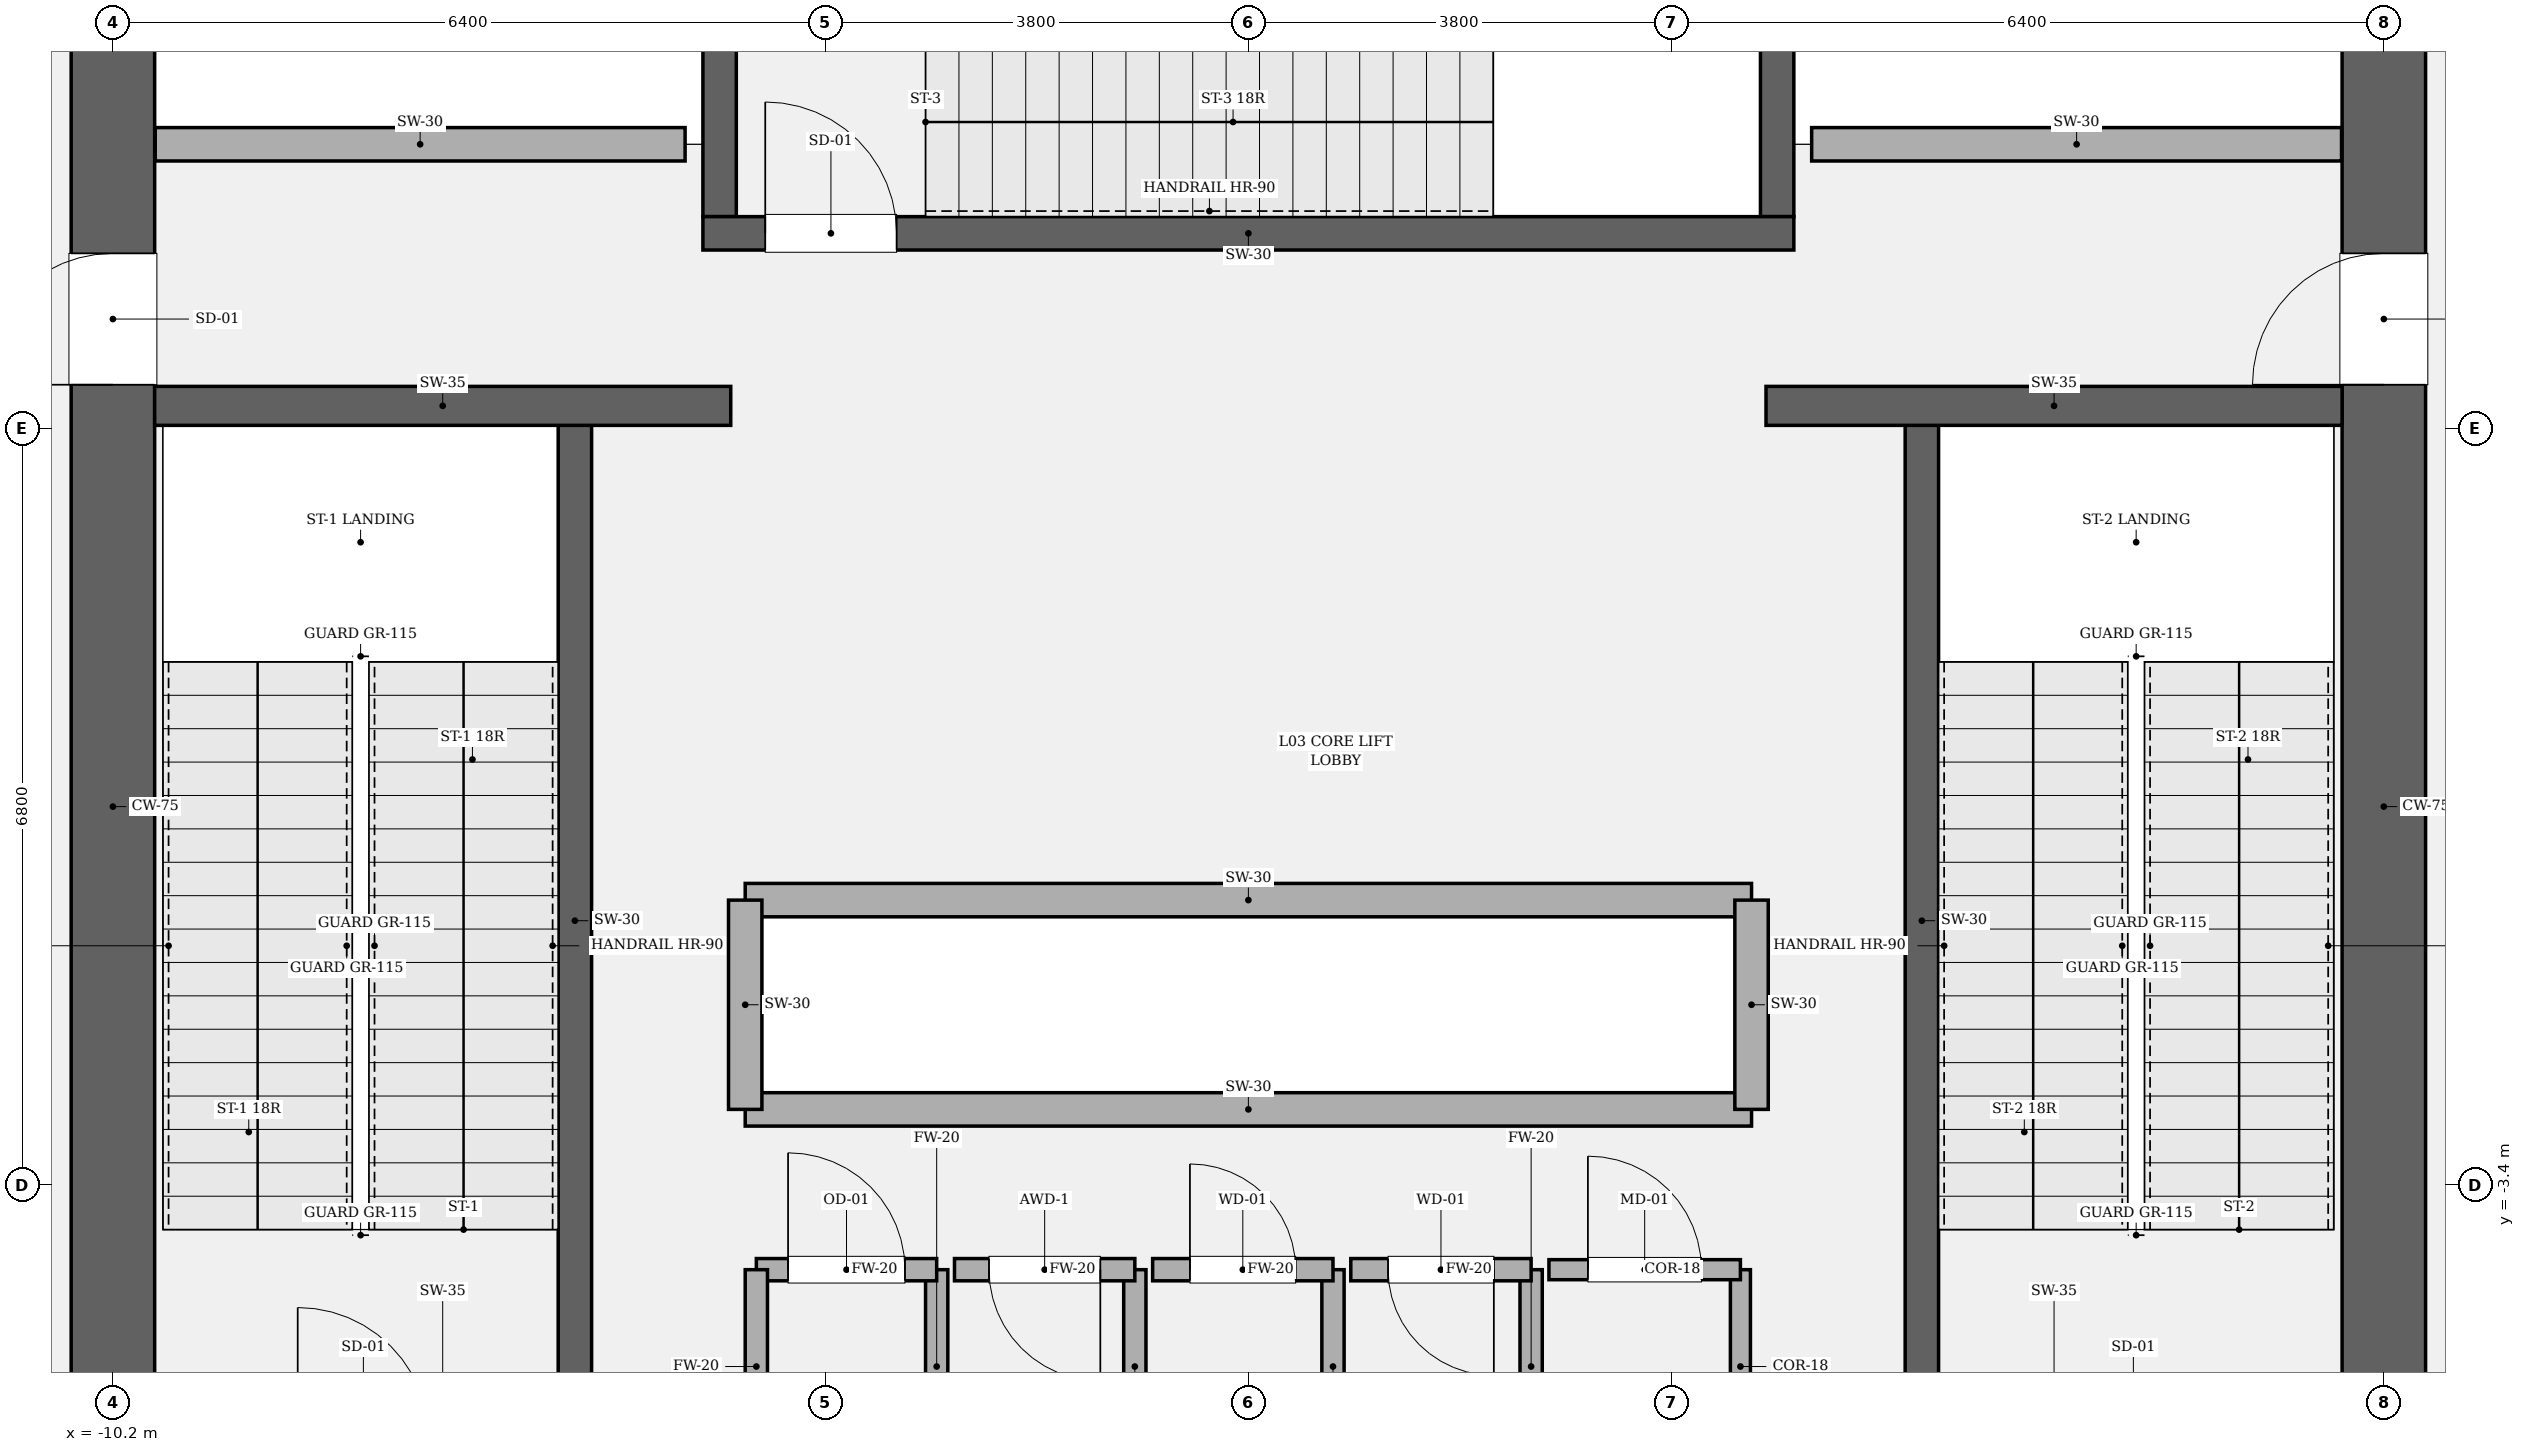
"""IFC4 building model, lengths in metres.
Left out: names, types, materials, properties, quantities, classifications, styles, units other than length and angle.
Written with IfcOpenShell. Run it as: python <this file> out.ifc"""

import sys

from ifc_helpers import new_model, si_unit, direction, frame, frame_2d, origin, place, context, subcontext, project, spatial, rectangle, extrude, element, fill, save


model = new_model("IFC4")
c1 = context("Model", 3, precision=1e-05, world=origin(), true_north=direction((0.0, 1.0)))
c2 = subcontext(c1, "Body", "Model", "MODEL_VIEW")
j1 = project(units=[si_unit("LENGTHUNIT", "METRE"), si_unit("PLANEANGLEUNIT", "RADIAN")], contexts=[c1])
p1 = place(None, origin())
s1 = spatial("IfcSite", under=j1, at=p1, CompositionType="ELEMENT")
p2 = place(p1, origin())
s2 = spatial("IfcBuilding", under=s1, at=p2, CompositionType="ELEMENT")
p3 = place(p2, frame((0.0, 0.0, 16.8)))
s3 = spatial("IfcBuildingStorey", under=s2, at=p3, CompositionType="ELEMENT", Elevation=16.8)
p4 = place(p3, frame((-10.2, -8.825, 0.0), z_axis=(0.0, 0.0, 1.0), x_axis=(0.0, 1.0, 0.0)))
e1 = element("IfcWall", 1, at=p4, inside=s3, PredefinedType="SHEAR", context=c2, shape_type="SweptSolid", body=[
    extrude(rectangle(XDim=17.65, YDim=0.75, at=frame_2d((8.825, 0.0))), origin(), (0.0, 0.0, 1.0), 5.4),
])
p5 = place(p4, frame((12.615, 0.0, 0.0)))
e2 = element("IfcOpeningElement", 2, at=p5, cuts=e1, PredefinedType="OPENING", context=c2, shape_type="SweptSolid", body=[
    extrude(rectangle(XDim=1.18, YDim=2.2, at=frame_2d((0.59, 1.1))), frame((0.0, 0.385, 0.0), z_axis=(0.0, -1.0, 0.0), x_axis=(1.0, 0.0, 0.0)), (0.0, 0.0, 1.0), 0.77),
])
p6 = place(p3, frame((10.2, 8.825, 0.0), z_axis=(0.0, 0.0, 1.0), x_axis=(0.0, -1.0, 0.0)))
e3 = element("IfcWall", 3, at=p6, inside=s3, PredefinedType="SHEAR", context=c2, shape_type="SweptSolid", body=[
    extrude(rectangle(XDim=17.65, YDim=0.75, at=frame_2d((8.825, 0.0))), origin(), (0.0, 0.0, 1.0), 5.4),
])
p7 = place(p6, frame((3.855, 0.0, 0.0)))
e4 = element("IfcOpeningElement", 4, at=p7, cuts=e3, PredefinedType="OPENING", context=c2, shape_type="SweptSolid", body=[
    extrude(rectangle(XDim=1.18, YDim=2.2, at=frame_2d((0.59, 1.1))), frame((0.0, 0.385, 0.0), z_axis=(0.0, -1.0, 0.0), x_axis=(1.0, 0.0, 0.0)), (0.0, 0.0, 1.0), 0.77),
])
for number, where, z_axis, x_axis in (
    (5, (-6.05, -5.5, 0.0), (0.0, 0.0, 1.0), (0.0, 1.0, 0.0)),
    (6, (6.05, 3.45, 0.0), (0.0, 0.0, 1.0), (0.0, -1.0, 0.0)),
):
    element("IfcWall", number, at=place(p3, frame(where, z_axis=z_axis, x_axis=x_axis)), inside=s3, PredefinedType="SOLIDWALL", context=c2, shape_type="SweptSolid", body=[
        extrude(rectangle(XDim=8.95, YDim=0.3, at=frame_2d((4.475, 0.0))), origin(), (0.0, 0.0, 1.0), 5.4),
    ])
for number, where, z_axis, x_axis in (
    (7, (-4.75, 5.3, 0.0), (0.0, 0.0, 1.0), (0.0, 1.0, 0.0)),
    (8, (4.75, 8.825, 0.0), (0.0, 0.0, 1.0), (0.0, -1.0, 0.0)),
):
    element("IfcWall", number, at=place(p3, frame(where, z_axis=z_axis, x_axis=x_axis)), inside=s3, PredefinedType="SOLIDWALL", context=c2, shape_type="SweptSolid", body=[
        extrude(rectangle(XDim=3.525, YDim=0.3, at=frame_2d((1.762, 0.0))), origin(), (0.0, 0.0, 1.0), 5.4),
    ])
p8 = place(p3, frame((-4.9, 5.15, 0.0), z_axis=(0.0, 0.0, 1.0), x_axis=(1.0, 0.0, 0.0)))
e9 = element("IfcWall", 9, at=p8, inside=s3, PredefinedType="SOLIDWALL", context=c2, shape_type="SweptSolid", body=[
    extrude(rectangle(XDim=9.8, YDim=0.3, at=frame_2d((4.9, 0.0))), origin(), (0.0, 0.0, 1.0), 5.4),
])
p9 = place(p8, frame((0.56, 0.0, 0.0)))
e10 = element("IfcOpeningElement", 10, at=p9, cuts=e9, PredefinedType="OPENING", context=c2, shape_type="SweptSolid", body=[
    extrude(rectangle(XDim=1.18, YDim=2.2, at=frame_2d((0.59, 1.1))), frame((0.0, 0.16, 0.0), z_axis=(0.0, -1.0, 0.0), x_axis=(1.0, 0.0, 0.0)), (0.0, 0.0, 1.0), 0.32),
])
for number, where, z_axis, x_axis in (
    (11, (-9.825, 3.6, 0.0), (0.0, 0.0, 1.0), (1.0, 0.0, 0.0)),
    (12, (4.65, 3.6, 0.0), (0.0, 0.0, 1.0), (1.0, 0.0, 0.0)),
):
    element("IfcWall", number, at=place(p3, frame(where, z_axis=z_axis, x_axis=x_axis)), inside=s3, PredefinedType="SOLIDWALL", context=c2, shape_type="SweptSolid", body=[
        extrude(rectangle(XDim=5.175, YDim=0.35, at=frame_2d((2.587, 0.0))), origin(), (0.0, 0.0, 1.0), 5.4),
    ])
for number, where, z_axis, x_axis in (
    (13, (-4.52, -0.84, 0.0), (0.0, 0.0, 1.0), (1.0, 0.0, 0.0)),
    (14, (-4.52, -2.72, 0.0), (0.0, 0.0, 1.0), (1.0, 0.0, 0.0)),
):
    element("IfcWall", number, at=place(p3, frame(where, z_axis=z_axis, x_axis=x_axis)), inside=s3, PredefinedType="SOLIDWALL", context=c2, shape_type="SweptSolid", body=[
        extrude(rectangle(XDim=9.04, YDim=0.3, at=frame_2d((4.52, 0.0))), origin(), (0.0, 0.0, 1.0), 5.02),
    ])
for number, where, z_axis, x_axis in (
    (15, (-4.52, -2.72, 0.0), (0.0, 0.0, 1.0), (0.0, 1.0, 0.0)),
    (16, (4.52, -2.72, 0.0), (0.0, 0.0, 1.0), (0.0, 1.0, 0.0)),
):
    element("IfcWall", number, at=place(p3, frame(where, z_axis=z_axis, x_axis=x_axis)), inside=s3, PredefinedType="SOLIDWALL", context=c2, shape_type="SweptSolid", body=[
        extrude(rectangle(XDim=1.88, YDim=0.3, at=frame_2d((0.94, 0.0))), origin(), (0.0, 0.0, 1.0), 5.02),
    ])
for number, where, z_axis, x_axis in (
    (17, (-9.82, 5.95, 0.0), (0.0, 0.0, 1.0), (1.0, 0.0, 0.0)),
    (18, (5.06, 5.95, 0.0), (0.0, 0.0, 1.0), (1.0, 0.0, 0.0)),
):
    element("IfcWall", number, at=place(p3, frame(where, z_axis=z_axis, x_axis=x_axis)), inside=s3, PredefinedType="SOLIDWALL", context=c2, shape_type="SweptSolid", body=[
        extrude(rectangle(XDim=4.76, YDim=0.3, at=frame_2d((2.38, 0.0))), origin(), (0.0, 0.0, 1.0), 5.02),
    ])
p10 = place(p3, frame((-2.8, -5.9, 0.0), z_axis=(0.0, 0.0, 1.0), x_axis=(0.0, 1.0, 0.0)))
e19 = element("IfcWall", 19, at=p10, inside=s3, PredefinedType="SOLIDWALL", context=c2, shape_type="SweptSolid", body=[
    extrude(rectangle(XDim=1.74, YDim=0.2, at=frame_2d((0.87, 0.0))), origin(), (0.0, 0.0, 1.0), 5.02),
])
p11 = place(p3, frame((-2.8, -4.16, 0.0), z_axis=(0.0, 0.0, 1.0), x_axis=(-1.0, 0.0, 0.0)))
e20 = element("IfcWall", 20, at=p11, inside=s3, PredefinedType="SOLIDWALL", context=c2, shape_type="SweptSolid", body=[
    extrude(rectangle(XDim=1.62, YDim=0.2, at=frame_2d((0.81, 0.0))), origin(), (0.0, 0.0, 1.0), 5.02),
])
p12 = place(p11, frame((0.285, 0.0, 0.0)))
e21 = element("IfcOpeningElement", 21, at=p12, cuts=e20, PredefinedType="OPENING", context=c2, shape_type="SweptSolid", body=[
    extrude(rectangle(XDim=1.05, YDim=2.2, at=frame_2d((0.525, 1.1))), frame((0.0, 0.11, 0.0), z_axis=(0.0, -1.0, 0.0), x_axis=(1.0, 0.0, 0.0)), (0.0, 0.0, 1.0), 0.22),
])
for number, where, z_axis, x_axis in (
    (22, (-4.42, -4.16, 0.0), (0.0, 0.0, 1.0), (0.0, -1.0, 0.0)),
    (23, (-1.02, -5.9, 0.0), (0.0, 0.0, 1.0), (0.0, 1.0, 0.0)),
):
    element("IfcWall", number, at=place(p3, frame(where, z_axis=z_axis, x_axis=x_axis)), inside=s3, PredefinedType="SOLIDWALL", context=c2, shape_type="SweptSolid", body=[
        extrude(rectangle(XDim=1.74, YDim=0.2, at=frame_2d((0.87, 0.0))), origin(), (0.0, 0.0, 1.0), 5.02),
    ])
p13 = place(p3, frame((-1.02, -4.16, 0.0), z_axis=(0.0, 0.0, 1.0), x_axis=(-1.0, 0.0, 0.0)))
e24 = element("IfcWall", 24, at=p13, inside=s3, PredefinedType="SOLIDWALL", context=c2, shape_type="SweptSolid", body=[
    extrude(rectangle(XDim=1.62, YDim=0.2, at=frame_2d((0.81, 0.0))), origin(), (0.0, 0.0, 1.0), 5.02),
])
p14 = place(p13, frame((0.31, 0.0, 0.0)))
e25 = element("IfcOpeningElement", 25, at=p14, cuts=e24, PredefinedType="OPENING", context=c2, shape_type="SweptSolid", body=[
    extrude(rectangle(XDim=1.0, YDim=2.15, at=frame_2d((0.5, 1.075))), frame((0.0, 0.11, 0.0), z_axis=(0.0, -1.0, 0.0), x_axis=(1.0, 0.0, 0.0)), (0.0, 0.0, 1.0), 0.22),
])
p15 = place(p3, frame((0.76, -5.9, 0.0), z_axis=(0.0, 0.0, 1.0), x_axis=(0.0, 1.0, 0.0)))
e26 = element("IfcWall", 26, at=p15, inside=s3, PredefinedType="SOLIDWALL", context=c2, shape_type="SweptSolid", body=[
    extrude(rectangle(XDim=1.74, YDim=0.2, at=frame_2d((0.87, 0.0))), origin(), (0.0, 0.0, 1.0), 5.02),
])
p16 = place(p3, frame((0.76, -4.16, 0.0), z_axis=(0.0, 0.0, 1.0), x_axis=(-1.0, 0.0, 0.0)))
e27 = element("IfcWall", 27, at=p16, inside=s3, PredefinedType="SOLIDWALL", context=c2, shape_type="SweptSolid", body=[
    extrude(rectangle(XDim=1.62, YDim=0.2, at=frame_2d((0.81, 0.0))), origin(), (0.0, 0.0, 1.0), 5.02),
])
p17 = place(p16, frame((0.335, 0.0, 0.0)))
e28 = element("IfcOpeningElement", 28, at=p17, cuts=e27, PredefinedType="OPENING", context=c2, shape_type="SweptSolid", body=[
    extrude(rectangle(XDim=0.95, YDim=2.15, at=frame_2d((0.475, 1.075))), frame((0.0, 0.11, 0.0), z_axis=(0.0, -1.0, 0.0), x_axis=(1.0, 0.0, 0.0)), (0.0, 0.0, 1.0), 0.22),
])
p18 = place(p3, frame((2.54, -5.9, 0.0), z_axis=(0.0, 0.0, 1.0), x_axis=(0.0, 1.0, 0.0)))
e29 = element("IfcWall", 29, at=p18, inside=s3, PredefinedType="SOLIDWALL", context=c2, shape_type="SweptSolid", body=[
    extrude(rectangle(XDim=1.74, YDim=0.2, at=frame_2d((0.87, 0.0))), origin(), (0.0, 0.0, 1.0), 5.02),
])
p19 = place(p3, frame((2.54, -4.16, 0.0), z_axis=(0.0, 0.0, 1.0), x_axis=(-1.0, 0.0, 0.0)))
e30 = element("IfcWall", 30, at=p19, inside=s3, PredefinedType="SOLIDWALL", context=c2, shape_type="SweptSolid", body=[
    extrude(rectangle(XDim=1.62, YDim=0.2, at=frame_2d((0.81, 0.0))), origin(), (0.0, 0.0, 1.0), 5.02),
])
p20 = place(p19, frame((0.335, 0.0, 0.0)))
e31 = element("IfcOpeningElement", 31, at=p20, cuts=e30, PredefinedType="OPENING", context=c2, shape_type="SweptSolid", body=[
    extrude(rectangle(XDim=0.95, YDim=2.15, at=frame_2d((0.475, 1.075))), frame((0.0, 0.11, 0.0), z_axis=(0.0, -1.0, 0.0), x_axis=(1.0, 0.0, 0.0)), (0.0, 0.0, 1.0), 0.22),
])
p21 = place(p3, frame((4.42, -5.9, 0.0), z_axis=(0.0, 0.0, 1.0), x_axis=(0.0, 1.0, 0.0)))
e32 = element("IfcWall", 32, at=p21, inside=s3, PredefinedType="PARTITIONING", context=c2, shape_type="SweptSolid", body=[
    extrude(rectangle(XDim=1.74, YDim=0.18, at=frame_2d((0.87, 0.0))), origin(), (0.0, 0.0, 1.0), 5.02),
])
p22 = place(p3, frame((4.42, -4.16, 0.0), z_axis=(0.0, 0.0, 1.0), x_axis=(-1.0, 0.0, 0.0)))
e33 = element("IfcWall", 33, at=p22, inside=s3, PredefinedType="PARTITIONING", context=c2, shape_type="SweptSolid", body=[
    extrude(rectangle(XDim=1.72, YDim=0.18, at=frame_2d((0.86, 0.0))), origin(), (0.0, 0.0, 1.0), 5.02),
])
p23 = place(p22, frame((0.35, 0.0, 0.0)))
e34 = element("IfcOpeningElement", 34, at=p23, cuts=e33, PredefinedType="OPENING", context=c2, shape_type="SweptSolid", body=[
    extrude(rectangle(XDim=1.02, YDim=2.2, at=frame_2d((0.51, 1.1))), frame((0.0, 0.1, 0.0), z_axis=(0.0, -1.0, 0.0), x_axis=(1.0, 0.0, 0.0)), (0.0, 0.0, 1.0), 0.2),
])
p24 = place(p9, origin())
e35 = element("IfcDoor", 35, at=p24, inside=s3, OperationType="SINGLE_SWING_LEFT", PredefinedType="DOOR", context=c2, shape_type="SweptSolid", body=[
    extrude(rectangle(XDim=1.18, YDim=2.2, at=frame_2d((0.59, 1.1))), frame((0.0, 0.025, 0.0), z_axis=(0.0, -1.0, 0.0), x_axis=(1.0, 0.0, 0.0)), (0.0, 0.0, 1.0), 0.05),
])
fill(e10, e35)
p25 = place(p5, origin())
e36 = element("IfcDoor", 36, at=p25, inside=s3, OperationType="SINGLE_SWING_LEFT", PredefinedType="DOOR", context=c2, shape_type="SweptSolid", body=[
    extrude(rectangle(XDim=1.18, YDim=2.2, at=frame_2d((0.59, 1.1))), frame((0.0, 0.025, 0.0), z_axis=(0.0, -1.0, 0.0), x_axis=(1.0, 0.0, 0.0)), (0.0, 0.0, 1.0), 0.05),
])
fill(e2, e36)
p26 = place(p7, origin())
e37 = element("IfcDoor", 37, at=p26, inside=s3, OperationType="SINGLE_SWING_RIGHT", PredefinedType="DOOR", context=c2, shape_type="SweptSolid", body=[
    extrude(rectangle(XDim=1.18, YDim=2.2, at=frame_2d((0.59, 1.1))), frame((0.0, 0.025, 0.0), z_axis=(0.0, -1.0, 0.0), x_axis=(1.0, 0.0, 0.0)), (0.0, 0.0, 1.0), 0.05),
])
fill(e4, e37)
p27 = place(p12, origin())
e38 = element("IfcDoor", 38, at=p27, inside=s3, OperationType="SINGLE_SWING_RIGHT", PredefinedType="DOOR", context=c2, shape_type="SweptSolid", body=[
    extrude(rectangle(XDim=1.05, YDim=2.2, at=frame_2d((0.525, 1.1))), frame((0.0, 0.025, 0.0), z_axis=(0.0, -1.0, 0.0), x_axis=(1.0, 0.0, 0.0)), (0.0, 0.0, 1.0), 0.05),
])
fill(e21, e38)
p28 = place(p14, origin())
e39 = element("IfcDoor", 39, at=p28, inside=s3, OperationType="SINGLE_SWING_LEFT", PredefinedType="DOOR", context=c2, shape_type="SweptSolid", body=[
    extrude(rectangle(XDim=1.0, YDim=2.15, at=frame_2d((0.5, 1.075))), frame((0.0, 0.025, 0.0), z_axis=(0.0, -1.0, 0.0), x_axis=(1.0, 0.0, 0.0)), (0.0, 0.0, 1.0), 0.05),
])
fill(e25, e39)
p29 = place(p17, origin())
e40 = element("IfcDoor", 40, at=p29, inside=s3, OperationType="SINGLE_SWING_RIGHT", PredefinedType="DOOR", context=c2, shape_type="SweptSolid", body=[
    extrude(rectangle(XDim=0.95, YDim=2.15, at=frame_2d((0.475, 1.075))), frame((0.0, 0.025, 0.0), z_axis=(0.0, -1.0, 0.0), x_axis=(1.0, 0.0, 0.0)), (0.0, 0.0, 1.0), 0.05),
])
fill(e28, e40)
p30 = place(p20, origin())
e41 = element("IfcDoor", 41, at=p30, inside=s3, OperationType="SINGLE_SWING_LEFT", PredefinedType="DOOR", context=c2, shape_type="SweptSolid", body=[
    extrude(rectangle(XDim=0.95, YDim=2.15, at=frame_2d((0.475, 1.075))), frame((0.0, 0.025, 0.0), z_axis=(0.0, -1.0, 0.0), x_axis=(1.0, 0.0, 0.0)), (0.0, 0.0, 1.0), 0.05),
])
fill(e31, e41)
p31 = place(p23, origin())
e42 = element("IfcDoor", 42, at=p31, inside=s3, OperationType="SINGLE_SWING_RIGHT", PredefinedType="DOOR", context=c2, shape_type="SweptSolid", body=[
    extrude(rectangle(XDim=1.02, YDim=2.2, at=frame_2d((0.51, 1.1))), frame((0.0, 0.025, 0.0), z_axis=(0.0, -1.0, 0.0), x_axis=(1.0, 0.0, 0.0)), (0.0, 0.0, 1.0), 0.05),
])
fill(e34, e42)
save(model, sys.argv[1])
